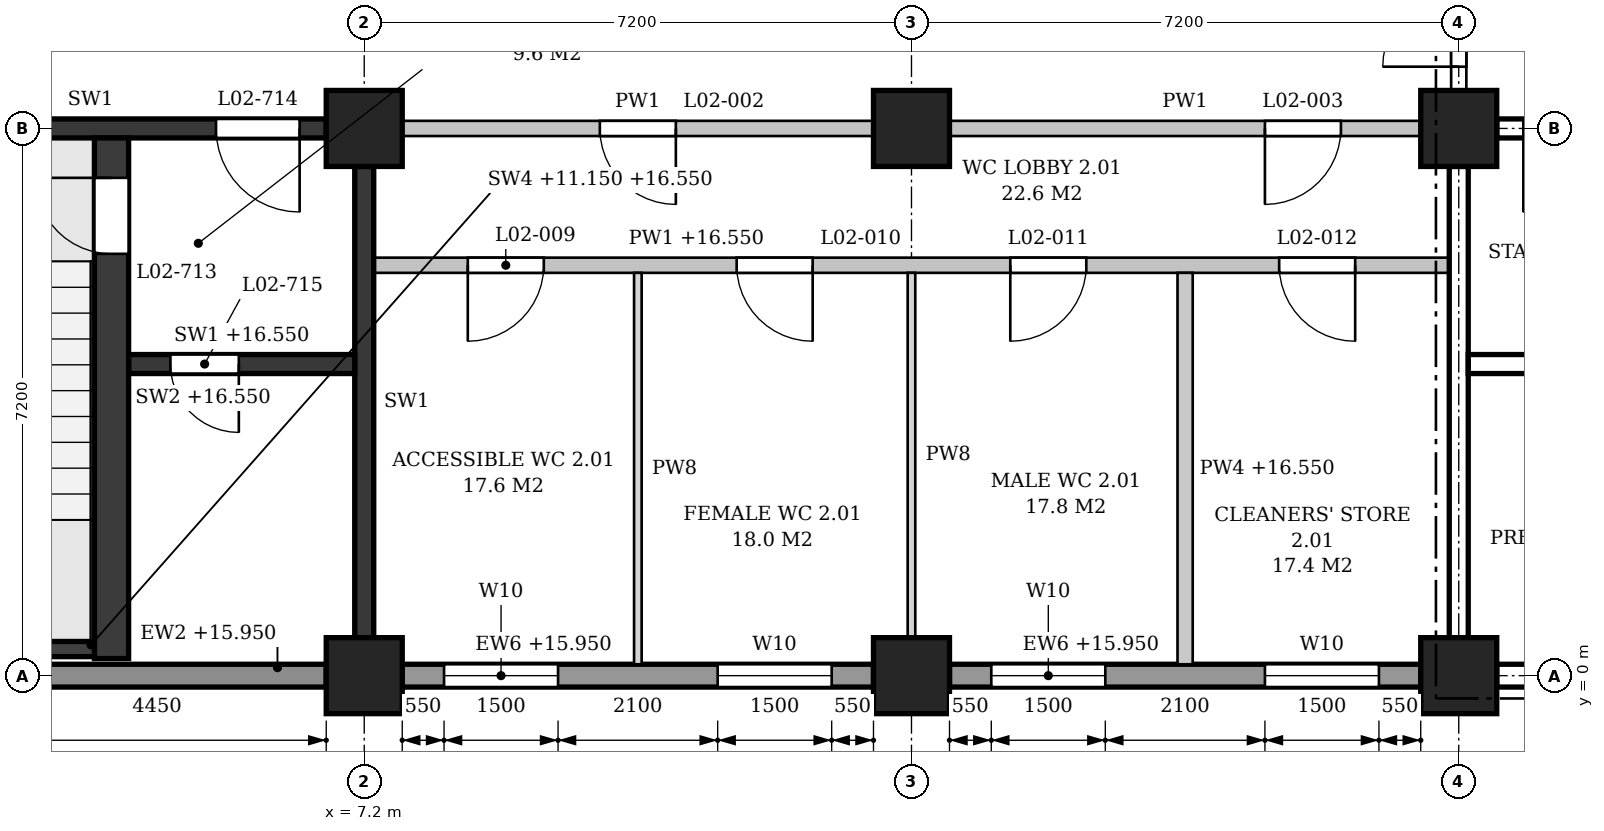
"""IFC4 building model, lengths in metres.
Left out: names, types, materials, properties, quantities, classifications, styles, units other than length and angle.
Written with IfcOpenShell. Run it as: python <this file> out.ifc"""

import sys

from ifc_helpers import new_model, si_unit, direction, frame, frame_2d, origin, origin_2d, place, context, subcontext, project, spatial, polyline, rectangle, outline, extrude, element, fill, save


model = new_model("IFC4")
c1 = context("Model", 3, precision=1e-05, world=origin(), true_north=direction((0.0, 1.0)))
c2 = subcontext(c1, "Body", "Model", "MODEL_VIEW")
j1 = project(units=[si_unit("LENGTHUNIT", "METRE"), si_unit("PLANEANGLEUNIT", "RADIAN")], contexts=[c1])
p1 = place(None, origin())
s1 = spatial("IfcSite", under=j1, at=p1, CompositionType="ELEMENT")
p2 = place(p1, origin())
s2 = spatial("IfcBuilding", under=s1, at=p2, CompositionType="ELEMENT")
p3 = place(p2, frame((0.0, 0.0, 11.4)))
s3 = spatial("IfcBuildingStorey", under=s2, at=p3, CompositionType="ELEMENT", Elevation=11.4)
for number, where, z_axis, x_axis in (
    (1, (7.2, 0.0, 0.0), (0.0, 0.0, 1.0), (1.0, 0.0, 0.0)),
    (2, (7.2, 7.2, 0.0), (0.0, 0.0, 1.0), (1.0, 0.0, 0.0)),
    (3, (14.4, 0.0, 0.0), (0.0, 0.0, 1.0), (1.0, 0.0, 0.0)),
    (4, (14.4, 7.2, 0.0), (0.0, 0.0, 1.0), (1.0, 0.0, 0.0)),
    (5, (21.6, 0.0, 0.0), (0.0, 0.0, 1.0), (1.0, 0.0, 0.0)),
    (6, (21.6, 7.2, 0.0), (0.0, 0.0, 1.0), (1.0, 0.0, 0.0)),
):
    element("IfcColumn", number, at=place(p3, frame(where, z_axis=z_axis, x_axis=x_axis)), inside=s3, PredefinedType="COLUMN", context=c2, shape_type="SweptSolid", body=[
        extrude(rectangle(XDim=1.0, YDim=1.0, at=origin_2d()), origin(), (0.0, 0.0, 1.0), 5.4),
    ])
p4 = place(p3, frame((0.5, 0.0, 0.0), z_axis=(0.0, 0.0, 1.0), x_axis=(1.0, 0.0, 0.0)))
e7 = element("IfcWall", 7, at=p4, inside=s3, PredefinedType="STANDARD", context=c2, shape_type="SweptSolid", body=[
    extrude(rectangle(XDim=6.2, YDim=0.3, at=frame_2d((3.1, 0.0))), origin(), (0.0, 0.0, 1.0), 4.55),
])
p5 = place(p4, frame((0.85, 0.0, 0.9)))
e8 = element("IfcOpeningElement", 8, at=p5, cuts=e7, PredefinedType="OPENING", context=c2, shape_type="SweptSolid", body=[
    extrude(outline(polyline([(0.0, 0.0), (0.9, 0.0), (0.9, 2.65), (0.45, 3.1), (0.0, 2.65), (0.0, 0.0)])), frame((0.0, 0.16, 0.0), z_axis=(0.0, -1.0, 0.0), x_axis=(1.0, 0.0, 0.0)), (0.0, 0.0, 1.0), 0.32),
])
p6 = place(p3, frame((7.7, 0.0, 0.0), z_axis=(0.0, 0.0, 1.0), x_axis=(1.0, 0.0, 0.0)))
e9 = element("IfcWall", 9, at=p6, inside=s3, PredefinedType="STANDARD", context=c2, shape_type="SweptSolid", body=[
    extrude(rectangle(XDim=6.2, YDim=0.3, at=frame_2d((3.1, 0.0))), origin(), (0.0, 0.0, 1.0), 4.55),
])
p7 = place(p6, frame((0.55, 0.0, 0.9)))
e10 = element("IfcOpeningElement", 10, at=p7, cuts=e9, PredefinedType="OPENING", context=c2, shape_type="SweptSolid", body=[
    extrude(outline(polyline([(0.0, 0.0), (1.5, 0.0), (1.5, 2.35), (0.75, 3.1), (0.0, 2.35), (0.0, 0.0)])), frame((0.0, 0.16, 0.0), z_axis=(0.0, -1.0, 0.0), x_axis=(1.0, 0.0, 0.0)), (0.0, 0.0, 1.0), 0.32),
])
p8 = place(p6, frame((4.15, 0.0, 0.9)))
e11 = element("IfcOpeningElement", 11, at=p8, cuts=e9, PredefinedType="OPENING", context=c2, shape_type="SweptSolid", body=[
    extrude(outline(polyline([(0.0, 0.0), (1.5, 0.0), (1.5, 2.35), (0.75, 3.1), (0.0, 2.35), (0.0, 0.0)])), frame((0.0, 0.16, 0.0), z_axis=(0.0, -1.0, 0.0), x_axis=(1.0, 0.0, 0.0)), (0.0, 0.0, 1.0), 0.32),
])
p9 = place(p3, frame((14.9, 0.0, 0.0), z_axis=(0.0, 0.0, 1.0), x_axis=(1.0, 0.0, 0.0)))
e12 = element("IfcWall", 12, at=p9, inside=s3, PredefinedType="STANDARD", context=c2, shape_type="SweptSolid", body=[
    extrude(rectangle(XDim=6.2, YDim=0.3, at=frame_2d((3.1, 0.0))), origin(), (0.0, 0.0, 1.0), 4.55),
])
p10 = place(p9, frame((0.55, 0.0, 0.9)))
e13 = element("IfcOpeningElement", 13, at=p10, cuts=e12, PredefinedType="OPENING", context=c2, shape_type="SweptSolid", body=[
    extrude(outline(polyline([(0.0, 0.0), (1.5, 0.0), (1.5, 2.35), (0.75, 3.1), (0.0, 2.35), (0.0, 0.0)])), frame((0.0, 0.16, 0.0), z_axis=(0.0, -1.0, 0.0), x_axis=(1.0, 0.0, 0.0)), (0.0, 0.0, 1.0), 0.32),
])
p11 = place(p9, frame((4.15, 0.0, 0.9)))
e14 = element("IfcOpeningElement", 14, at=p11, cuts=e12, PredefinedType="OPENING", context=c2, shape_type="SweptSolid", body=[
    extrude(outline(polyline([(0.0, 0.0), (1.5, 0.0), (1.5, 2.35), (0.75, 3.1), (0.0, 2.35), (0.0, 0.0)])), frame((0.0, 0.16, 0.0), z_axis=(0.0, -1.0, 0.0), x_axis=(1.0, 0.0, 0.0)), (0.0, 0.0, 1.0), 0.32),
])
p12 = place(p3, frame((22.1, 0.0, 0.0), z_axis=(0.0, 0.0, 1.0), x_axis=(1.0, 0.0, 0.0)))
e15 = element("IfcWall", 15, at=p12, inside=s3, PredefinedType="STANDARD", context=c2, shape_type="SweptSolid", body=[
    extrude(rectangle(XDim=6.2, YDim=0.3, at=frame_2d((3.1, 0.0))), origin(), (0.0, 0.0, 1.0), 4.55),
])
p13 = place(p12, frame((4.45, 0.0, 0.9)))
e16 = element("IfcOpeningElement", 16, at=p13, cuts=e15, PredefinedType="OPENING", context=c2, shape_type="SweptSolid", body=[
    extrude(outline(polyline([(0.0, 0.0), (0.9, 0.0), (0.9, 2.65), (0.45, 3.1), (0.0, 2.65), (0.0, 0.0)])), frame((0.0, 0.16, 0.0), z_axis=(0.0, -1.0, 0.0), x_axis=(1.0, 0.0, 0.0)), (0.0, 0.0, 1.0), 0.32),
])
p14 = place(p3, frame((0.5, 7.2, 0.0), z_axis=(0.0, 0.0, 1.0), x_axis=(1.0, 0.0, 0.0)))
e17 = element("IfcWall", 17, at=p14, inside=s3, PredefinedType="SHEAR", context=c2, shape_type="SweptSolid", body=[
    extrude(rectangle(XDim=6.2, YDim=0.25, at=frame_2d((3.1, 0.0))), origin(), (0.0, 0.0, 1.0), 4.4),
])
p15 = place(p14, frame((4.75, 0.0, 0.0)))
e18 = element("IfcOpeningElement", 18, at=p15, cuts=e17, PredefinedType="OPENING", context=c2, shape_type="SweptSolid", body=[
    extrude(rectangle(XDim=1.1, YDim=2.1, at=frame_2d((0.55, 1.05))), frame((0.0, 0.135, 0.0), z_axis=(0.0, -1.0, 0.0), x_axis=(1.0, 0.0, 0.0)), (0.0, 0.0, 1.0), 0.27),
])
p16 = place(p3, frame((7.2, 0.5, 0.0), z_axis=(0.0, 0.0, 1.0), x_axis=(0.0, 1.0, 0.0)))
e19 = element("IfcWall", 19, at=p16, inside=s3, PredefinedType="SHEAR", context=c2, shape_type="SweptSolid", body=[
    extrude(rectangle(XDim=6.2, YDim=0.25, at=frame_2d((3.1, 0.0))), origin(), (0.0, 0.0, 1.0), 4.4),
])
p17 = place(p3, frame((2.25, 0.35, -0.25), z_axis=(0.0, 0.0, 1.0), x_axis=(1.0, 0.0, 0.0)))
e20 = element("IfcWall", 20, at=p17, inside=s3, PredefinedType="SHEAR", context=c2, shape_type="SweptSolid", body=[
    extrude(rectangle(XDim=1.4, YDim=0.2, at=frame_2d((0.7, 0.0))), origin(), (0.0, 0.0, 1.0), 5.4),
])
p18 = place(p3, frame((3.875, 0.225, 0.0), z_axis=(0.0, 0.0, 1.0), x_axis=(0.0, 1.0, 0.0)))
e21 = element("IfcWall", 21, at=p18, inside=s3, PredefinedType="SHEAR", context=c2, shape_type="SweptSolid", body=[
    extrude(rectangle(XDim=6.85, YDim=0.45, at=frame_2d((3.425, 0.0))), origin(), (0.0, 0.0, 1.0), 5.15),
])
p19 = place(p18, frame((5.325, 0.0, 0.0)))
e22 = element("IfcOpeningElement", 22, at=p19, cuts=e21, PredefinedType="OPENING", context=c2, shape_type="SweptSolid", body=[
    extrude(rectangle(XDim=1.0, YDim=2.1, at=frame_2d((0.5, 1.05))), frame((0.0, 0.235, 0.0), z_axis=(0.0, -1.0, 0.0), x_axis=(1.0, 0.0, 0.0)), (0.0, 0.0, 1.0), 0.47),
])
p20 = place(p3, frame((4.1, 4.1, 0.0), z_axis=(0.0, 0.0, 1.0), x_axis=(1.0, 0.0, 0.0)))
e23 = element("IfcWall", 23, at=p20, inside=s3, PredefinedType="SHEAR", context=c2, shape_type="SweptSolid", body=[
    extrude(rectangle(XDim=2.975, YDim=0.25, at=frame_2d((1.487, 0.0))), origin(), (0.0, 0.0, 1.0), 5.15),
])
p21 = place(p20, frame((0.55, 0.0, 0.0)))
e24 = element("IfcOpeningElement", 24, at=p21, cuts=e23, PredefinedType="OPENING", context=c2, shape_type="SweptSolid", body=[
    extrude(rectangle(XDim=0.9, YDim=2.1, at=frame_2d((0.45, 1.05))), frame((0.0, 0.135, 0.0), z_axis=(0.0, -1.0, 0.0), x_axis=(1.0, 0.0, 0.0)), (0.0, 0.0, 1.0), 0.27),
])
p22 = place(p3, frame((22.1, 7.2, 0.0), z_axis=(0.0, 0.0, 1.0), x_axis=(1.0, 0.0, 0.0)))
e25 = element("IfcWall", 25, at=p22, inside=s3, PredefinedType="SHEAR", context=c2, shape_type="SweptSolid", body=[
    extrude(rectangle(XDim=6.2, YDim=0.25, at=frame_2d((3.1, 0.0))), origin(), (0.0, 0.0, 1.0), 4.4),
])
p23 = place(p22, frame((0.35, 0.0, 0.0)))
e26 = element("IfcOpeningElement", 26, at=p23, cuts=e25, PredefinedType="OPENING", context=c2, shape_type="SweptSolid", body=[
    extrude(rectangle(XDim=1.1, YDim=2.1, at=frame_2d((0.55, 1.05))), frame((0.0, 0.135, 0.0), z_axis=(0.0, -1.0, 0.0), x_axis=(1.0, 0.0, 0.0)), (0.0, 0.0, 1.0), 0.27),
])
p24 = place(p3, frame((21.6, 0.5, 0.0), z_axis=(0.0, 0.0, 1.0), x_axis=(0.0, 1.0, 0.0)))
e27 = element("IfcWall", 27, at=p24, inside=s3, PredefinedType="SHEAR", context=c2, shape_type="SweptSolid", body=[
    extrude(rectangle(XDim=6.2, YDim=0.25, at=frame_2d((3.1, 0.0))), origin(), (0.0, 0.0, 1.0), 4.4),
])
p25 = place(p3, frame((21.725, 4.1, 0.0), z_axis=(0.0, 0.0, 1.0), x_axis=(1.0, 0.0, 0.0)))
e28 = element("IfcWall", 28, at=p25, inside=s3, PredefinedType="SHEAR", context=c2, shape_type="SweptSolid", body=[
    extrude(rectangle(XDim=2.975, YDim=0.25, at=frame_2d((1.487, 0.0))), origin(), (0.0, 0.0, 1.0), 5.15),
])
p26 = place(p25, frame((1.525, 0.0, 0.0)))
e29 = element("IfcOpeningElement", 29, at=p26, cuts=e28, PredefinedType="OPENING", context=c2, shape_type="SweptSolid", body=[
    extrude(rectangle(XDim=0.9, YDim=2.1, at=frame_2d((0.45, 1.05))), frame((0.0, 0.135, 0.0), z_axis=(0.0, -1.0, 0.0), x_axis=(1.0, 0.0, 0.0)), (0.0, 0.0, 1.0), 0.27),
])
p27 = place(p3, frame((7.325, 5.4, 0.0), z_axis=(0.0, 0.0, 1.0), x_axis=(1.0, 0.0, 0.0)))
e30 = element("IfcWall", 30, at=p27, inside=s3, PredefinedType="PARTITIONING", context=c2, shape_type="SweptSolid", body=[
    extrude(outline(polyline([(0.0, 0.0), (14.15, 0.0), (14.15, 4.4), (14.025, 4.4), (14.025, 5.15), (7.325, 5.15), (7.325, 4.4), (6.825, 4.4), (6.825, 5.15), (0.125, 5.15), (0.125, 4.4), (0.0, 4.4), (0.0, 0.0)])), frame((0.0, 0.1, 0.0), z_axis=(0.0, -1.0, 0.0), x_axis=(1.0, 0.0, 0.0)), (0.0, 0.0, 1.0), 0.2),
])
p28 = place(p27, frame((1.238, 0.0, 0.0)))
e31 = element("IfcOpeningElement", 31, at=p28, cuts=e30, PredefinedType="OPENING", context=c2, shape_type="SweptSolid", body=[
    extrude(rectangle(XDim=1.0, YDim=2.1, at=frame_2d((0.5, 1.05))), frame((0.0, 0.11, 0.0), z_axis=(0.0, -1.0, 0.0), x_axis=(1.0, 0.0, 0.0)), (0.0, 0.0, 1.0), 0.22),
])
p29 = place(p27, frame((4.775, 0.0, 0.0)))
e32 = element("IfcOpeningElement", 32, at=p29, cuts=e30, PredefinedType="OPENING", context=c2, shape_type="SweptSolid", body=[
    extrude(rectangle(XDim=1.0, YDim=2.1, at=frame_2d((0.5, 1.05))), frame((0.0, 0.11, 0.0), z_axis=(0.0, -1.0, 0.0), x_axis=(1.0, 0.0, 0.0)), (0.0, 0.0, 1.0), 0.22),
])
p30 = place(p27, frame((8.375, 0.0, 0.0)))
e33 = element("IfcOpeningElement", 33, at=p30, cuts=e30, PredefinedType="OPENING", context=c2, shape_type="SweptSolid", body=[
    extrude(rectangle(XDim=1.0, YDim=2.1, at=frame_2d((0.5, 1.05))), frame((0.0, 0.11, 0.0), z_axis=(0.0, -1.0, 0.0), x_axis=(1.0, 0.0, 0.0)), (0.0, 0.0, 1.0), 0.22),
])
p31 = place(p27, frame((11.913, 0.0, 0.0)))
e34 = element("IfcOpeningElement", 34, at=p31, cuts=e30, PredefinedType="OPENING", context=c2, shape_type="SweptSolid", body=[
    extrude(rectangle(XDim=1.0, YDim=2.1, at=frame_2d((0.5, 1.05))), frame((0.0, 0.11, 0.0), z_axis=(0.0, -1.0, 0.0), x_axis=(1.0, 0.0, 0.0)), (0.0, 0.0, 1.0), 0.22),
])
p32 = place(p3, frame((7.7, 7.2, 0.0), z_axis=(0.0, 0.0, 1.0), x_axis=(1.0, 0.0, 0.0)))
e35 = element("IfcWall", 35, at=p32, inside=s3, PredefinedType="PARTITIONING", context=c2, shape_type="SweptSolid", body=[
    extrude(rectangle(XDim=6.2, YDim=0.2, at=frame_2d((3.1, 0.0))), origin(), (0.0, 0.0, 1.0), 4.4),
])
p33 = place(p32, frame((2.6, 0.0, 0.0)))
e36 = element("IfcOpeningElement", 36, at=p33, cuts=e35, PredefinedType="OPENING", context=c2, shape_type="SweptSolid", body=[
    extrude(rectangle(XDim=1.0, YDim=2.1, at=frame_2d((0.5, 1.05))), frame((0.0, 0.11, 0.0), z_axis=(0.0, -1.0, 0.0), x_axis=(1.0, 0.0, 0.0)), (0.0, 0.0, 1.0), 0.22),
])
p34 = place(p3, frame((14.9, 7.2, 0.0), z_axis=(0.0, 0.0, 1.0), x_axis=(1.0, 0.0, 0.0)))
e37 = element("IfcWall", 37, at=p34, inside=s3, PredefinedType="PARTITIONING", context=c2, shape_type="SweptSolid", body=[
    extrude(rectangle(XDim=6.2, YDim=0.2, at=frame_2d((3.1, 0.0))), origin(), (0.0, 0.0, 1.0), 4.4),
])
p35 = place(p34, frame((4.15, 0.0, 0.0)))
e38 = element("IfcOpeningElement", 38, at=p35, cuts=e37, PredefinedType="OPENING", context=c2, shape_type="SweptSolid", body=[
    extrude(rectangle(XDim=1.0, YDim=2.1, at=frame_2d((0.5, 1.05))), frame((0.0, 0.11, 0.0), z_axis=(0.0, -1.0, 0.0), x_axis=(1.0, 0.0, 0.0)), (0.0, 0.0, 1.0), 0.22),
])
p36 = place(p3, frame((10.8, 0.15, 0.0), z_axis=(0.0, 0.0, 1.0), x_axis=(0.0, 1.0, 0.0)))
e39 = element("IfcWall", 39, at=p36, inside=s3, PredefinedType="PARTITIONING", context=c2, shape_type="SweptSolid", body=[
    extrude(rectangle(XDim=5.15, YDim=0.1, at=frame_2d((2.575, 0.0))), origin(), (0.0, 0.0, 1.0), 4.4),
])
p37 = place(p3, frame((14.4, 0.5, 0.0), z_axis=(0.0, 0.0, 1.0), x_axis=(0.0, 1.0, 0.0)))
e40 = element("IfcWall", 40, at=p37, inside=s3, PredefinedType="PARTITIONING", context=c2, shape_type="SweptSolid", body=[
    extrude(rectangle(XDim=4.8, YDim=0.1, at=frame_2d((2.4, 0.0))), origin(), (0.0, 0.0, 1.0), 4.4),
])
p38 = place(p3, frame((18.0, 0.15, 0.0), z_axis=(0.0, 0.0, 1.0), x_axis=(0.0, 1.0, 0.0)))
e41 = element("IfcWall", 41, at=p38, inside=s3, PredefinedType="PARTITIONING", context=c2, shape_type="SweptSolid", body=[
    extrude(outline(polyline([(0.0, 0.0), (5.15, 0.0), (5.15, 5.15), (0.1, 5.15), (0.1, 4.55), (0.0, 4.55), (0.0, 0.0)])), frame((0.0, 0.1, 0.0), z_axis=(0.0, -1.0, 0.0), x_axis=(1.0, 0.0, 0.0)), (0.0, 0.0, 1.0), 0.2),
])
p39 = place(p3, frame((21.6, 7.7, 0.0), z_axis=(0.0, 0.0, 1.0), x_axis=(0.0, 1.0, 0.0)))
e42 = element("IfcWall", 42, at=p39, inside=s3, PredefinedType="PARTITIONING", context=c2, shape_type="SweptSolid", body=[
    extrude(rectangle(XDim=2.625, YDim=0.2, at=frame_2d((1.312, 0.0))), origin(), (0.0, 0.0, 1.0), 4.4),
])
p40 = place(p39, frame((0.312, 0.0, 0.0)))
e43 = element("IfcOpeningElement", 43, at=p40, cuts=e42, PredefinedType="OPENING", context=c2, shape_type="SweptSolid", body=[
    extrude(rectangle(XDim=2.0, YDim=2.4, at=frame_2d((1.0, 1.2))), frame((0.0, 0.11, 0.0), z_axis=(0.0, -1.0, 0.0), x_axis=(1.0, 0.0, 0.0)), (0.0, 0.0, 1.0), 0.22),
])
p41 = place(p7, origin())
e44 = element("IfcWindow", 44, at=p41, inside=s3, PartitioningType="SINGLE_PANEL", PredefinedType="WINDOW", context=c2, shape_type="SweptSolid", body=[
    extrude(outline(polyline([(0.0, 0.0), (1.5, 0.0), (1.5, 2.35), (0.75, 3.1), (0.0, 2.35), (0.0, 0.0)])), frame((0.0, 0.03, 0.0), z_axis=(0.0, -1.0, 0.0), x_axis=(1.0, 0.0, 0.0)), (0.0, 0.0, 1.0), 0.06),
])
fill(e10, e44)
p42 = place(p8, origin())
e45 = element("IfcWindow", 45, at=p42, inside=s3, PartitioningType="SINGLE_PANEL", PredefinedType="WINDOW", context=c2, shape_type="SweptSolid", body=[
    extrude(outline(polyline([(0.0, 0.0), (1.5, 0.0), (1.5, 2.35), (0.75, 3.1), (0.0, 2.35), (0.0, 0.0)])), frame((0.0, 0.03, 0.0), z_axis=(0.0, -1.0, 0.0), x_axis=(1.0, 0.0, 0.0)), (0.0, 0.0, 1.0), 0.06),
])
fill(e11, e45)
p43 = place(p10, origin())
e46 = element("IfcWindow", 46, at=p43, inside=s3, PartitioningType="SINGLE_PANEL", PredefinedType="WINDOW", context=c2, shape_type="SweptSolid", body=[
    extrude(outline(polyline([(0.0, 0.0), (1.5, 0.0), (1.5, 2.35), (0.75, 3.1), (0.0, 2.35), (0.0, 0.0)])), frame((0.0, 0.03, 0.0), z_axis=(0.0, -1.0, 0.0), x_axis=(1.0, 0.0, 0.0)), (0.0, 0.0, 1.0), 0.06),
])
fill(e13, e46)
p44 = place(p11, origin())
e47 = element("IfcWindow", 47, at=p44, inside=s3, PartitioningType="SINGLE_PANEL", PredefinedType="WINDOW", context=c2, shape_type="SweptSolid", body=[
    extrude(outline(polyline([(0.0, 0.0), (1.5, 0.0), (1.5, 2.35), (0.75, 3.1), (0.0, 2.35), (0.0, 0.0)])), frame((0.0, 0.03, 0.0), z_axis=(0.0, -1.0, 0.0), x_axis=(1.0, 0.0, 0.0)), (0.0, 0.0, 1.0), 0.06),
])
fill(e14, e47)
p45 = place(p19, origin())
e48 = element("IfcDoor", 48, at=p45, inside=s3, OperationType="SINGLE_SWING_RIGHT", PredefinedType="DOOR", context=c2, shape_type="SweptSolid", body=[
    extrude(rectangle(XDim=1.0, YDim=2.1, at=frame_2d((0.5, 1.05))), frame((0.0, 0.025, 0.0), z_axis=(0.0, -1.0, 0.0), x_axis=(1.0, 0.0, 0.0)), (0.0, 0.0, 1.0), 0.05),
])
fill(e22, e48)
p46 = place(p15, frame((1.1, 0.0, 0.0), z_axis=(0.0, 0.0, 1.0), x_axis=(-1.0, 0.0, 0.0)))
e49 = element("IfcDoor", 49, at=p46, inside=s3, OperationType="SINGLE_SWING_LEFT", PredefinedType="DOOR", context=c2, shape_type="SweptSolid", body=[
    extrude(rectangle(XDim=1.1, YDim=2.1, at=frame_2d((0.55, 1.05))), frame((0.0, 0.025, 0.0), z_axis=(0.0, -1.0, 0.0), x_axis=(1.0, 0.0, 0.0)), (0.0, 0.0, 1.0), 0.05),
])
fill(e18, e49)
p47 = place(p21, frame((0.9, 0.0, 0.0), z_axis=(0.0, 0.0, 1.0), x_axis=(-1.0, 0.0, 0.0)))
e50 = element("IfcDoor", 50, at=p47, inside=s3, OperationType="SINGLE_SWING_LEFT", PredefinedType="DOOR", context=c2, shape_type="SweptSolid", body=[
    extrude(rectangle(XDim=0.9, YDim=2.1, at=frame_2d((0.45, 1.05))), frame((0.0, 0.025, 0.0), z_axis=(0.0, -1.0, 0.0), x_axis=(1.0, 0.0, 0.0)), (0.0, 0.0, 1.0), 0.05),
])
fill(e24, e50)
p48 = place(p23, frame((1.1, 0.0, 0.0), z_axis=(0.0, 0.0, 1.0), x_axis=(-1.0, 0.0, 0.0)))
e51 = element("IfcDoor", 51, at=p48, inside=s3, OperationType="SINGLE_SWING_RIGHT", PredefinedType="DOOR", context=c2, shape_type="SweptSolid", body=[
    extrude(rectangle(XDim=1.1, YDim=2.1, at=frame_2d((0.55, 1.05))), frame((0.0, 0.025, 0.0), z_axis=(0.0, -1.0, 0.0), x_axis=(1.0, 0.0, 0.0)), (0.0, 0.0, 1.0), 0.05),
])
fill(e26, e51)
p49 = place(p40, origin())
e52 = element("IfcDoor", 52, at=p49, inside=s3, OperationType="DOUBLE_DOOR_SINGLE_SWING", PredefinedType="DOOR", context=c2, shape_type="SweptSolid", body=[
    extrude(rectangle(XDim=2.0, YDim=2.4, at=frame_2d((1.0, 1.2))), frame((0.0, 0.025, 0.0), z_axis=(0.0, -1.0, 0.0), x_axis=(1.0, 0.0, 0.0)), (0.0, 0.0, 1.0), 0.05),
])
fill(e43, e52)
p50 = place(p33, frame((1.0, 0.0, 0.0), z_axis=(0.0, 0.0, 1.0), x_axis=(-1.0, 0.0, 0.0)))
e53 = element("IfcDoor", 53, at=p50, inside=s3, OperationType="SINGLE_SWING_LEFT", PredefinedType="DOOR", context=c2, shape_type="SweptSolid", body=[
    extrude(rectangle(XDim=1.0, YDim=2.1, at=frame_2d((0.5, 1.05))), frame((0.0, 0.025, 0.0), z_axis=(0.0, -1.0, 0.0), x_axis=(1.0, 0.0, 0.0)), (0.0, 0.0, 1.0), 0.05),
])
fill(e36, e53)
p51 = place(p35, frame((1.0, 0.0, 0.0), z_axis=(0.0, 0.0, 1.0), x_axis=(-1.0, 0.0, 0.0)))
e54 = element("IfcDoor", 54, at=p51, inside=s3, OperationType="SINGLE_SWING_RIGHT", PredefinedType="DOOR", context=c2, shape_type="SweptSolid", body=[
    extrude(rectangle(XDim=1.0, YDim=2.1, at=frame_2d((0.5, 1.05))), frame((0.0, 0.025, 0.0), z_axis=(0.0, -1.0, 0.0), x_axis=(1.0, 0.0, 0.0)), (0.0, 0.0, 1.0), 0.05),
])
fill(e38, e54)
p52 = place(p28, frame((1.0, 0.0, 0.0), z_axis=(0.0, 0.0, 1.0), x_axis=(-1.0, 0.0, 0.0)))
e55 = element("IfcDoor", 55, at=p52, inside=s3, OperationType="SINGLE_SWING_RIGHT", PredefinedType="DOOR", context=c2, shape_type="SweptSolid", body=[
    extrude(rectangle(XDim=1.0, YDim=2.1, at=frame_2d((0.5, 1.05))), frame((0.0, 0.025, 0.0), z_axis=(0.0, -1.0, 0.0), x_axis=(1.0, 0.0, 0.0)), (0.0, 0.0, 1.0), 0.05),
])
fill(e31, e55)
p53 = place(p29, frame((1.0, 0.0, 0.0), z_axis=(0.0, 0.0, 1.0), x_axis=(-1.0, 0.0, 0.0)))
e56 = element("IfcDoor", 56, at=p53, inside=s3, OperationType="SINGLE_SWING_LEFT", PredefinedType="DOOR", context=c2, shape_type="SweptSolid", body=[
    extrude(rectangle(XDim=1.0, YDim=2.1, at=frame_2d((0.5, 1.05))), frame((0.0, 0.025, 0.0), z_axis=(0.0, -1.0, 0.0), x_axis=(1.0, 0.0, 0.0)), (0.0, 0.0, 1.0), 0.05),
])
fill(e32, e56)
p54 = place(p30, frame((1.0, 0.0, 0.0), z_axis=(0.0, 0.0, 1.0), x_axis=(-1.0, 0.0, 0.0)))
e57 = element("IfcDoor", 57, at=p54, inside=s3, OperationType="SINGLE_SWING_RIGHT", PredefinedType="DOOR", context=c2, shape_type="SweptSolid", body=[
    extrude(rectangle(XDim=1.0, YDim=2.1, at=frame_2d((0.5, 1.05))), frame((0.0, 0.025, 0.0), z_axis=(0.0, -1.0, 0.0), x_axis=(1.0, 0.0, 0.0)), (0.0, 0.0, 1.0), 0.05),
])
fill(e33, e57)
p55 = place(p31, frame((1.0, 0.0, 0.0), z_axis=(0.0, 0.0, 1.0), x_axis=(-1.0, 0.0, 0.0)))
e58 = element("IfcDoor", 58, at=p55, inside=s3, OperationType="SINGLE_SWING_LEFT", PredefinedType="DOOR", context=c2, shape_type="SweptSolid", body=[
    extrude(rectangle(XDim=1.0, YDim=2.1, at=frame_2d((0.5, 1.05))), frame((0.0, 0.025, 0.0), z_axis=(0.0, -1.0, 0.0), x_axis=(1.0, 0.0, 0.0)), (0.0, 0.0, 1.0), 0.05),
])
fill(e34, e58)
save(model, sys.argv[1])
